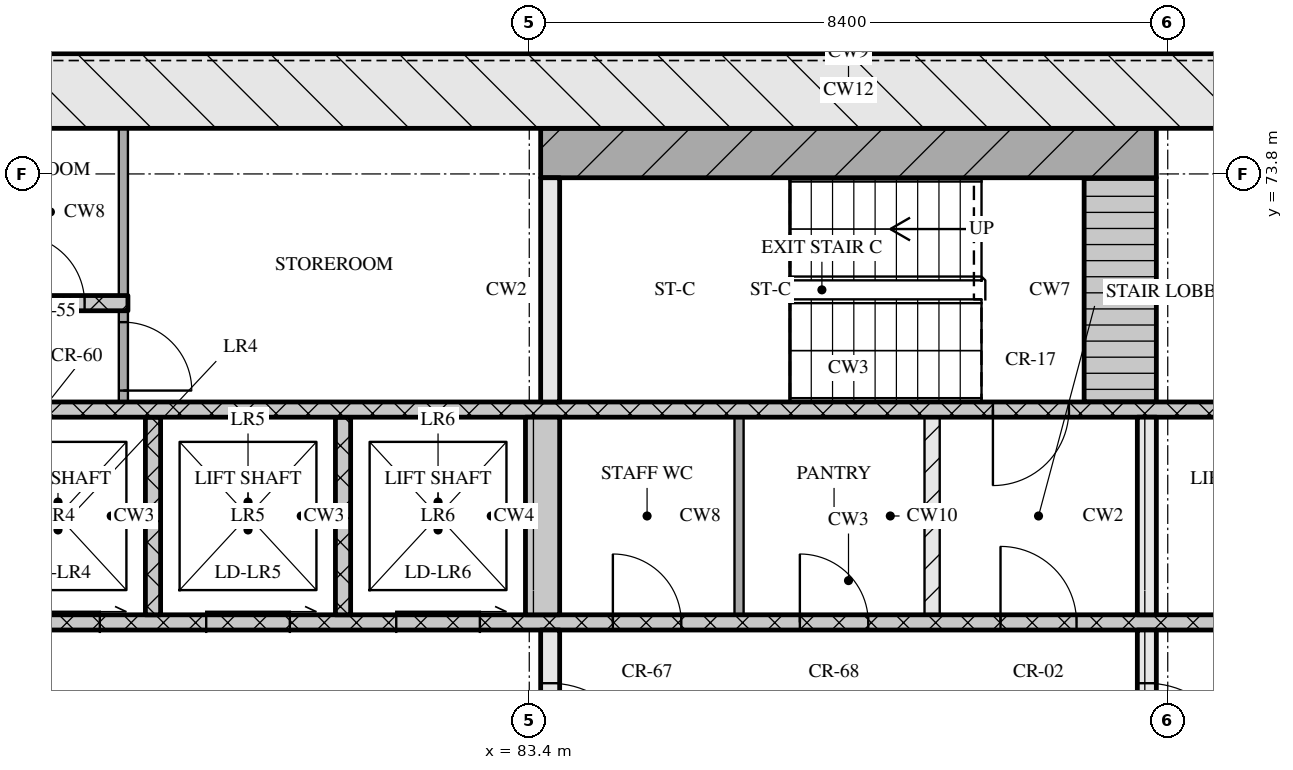
"""IFC4 building model, lengths in metres.
Left out: names, types, materials, properties, quantities, classifications, styles, units other than length and angle.
Written with IfcOpenShell. Run it as: python <this file> out.ifc"""

import sys

from ifc_helpers import new_model, si_unit, direction, frame, frame_2d, origin, place, context, subcontext, project, spatial, rectangle, extrude, element, fill, save


model = new_model("IFC4")
c1 = context("Model", 3, precision=1e-05, world=origin(), true_north=direction((0.0, 1.0)))
c2 = subcontext(c1, "Body", "Model", "MODEL_VIEW")
j1 = project(units=[si_unit("LENGTHUNIT", "METRE"), si_unit("PLANEANGLEUNIT", "RADIAN")], contexts=[c1])
p1 = place(None, origin())
s1 = spatial("IfcSite", under=j1, at=p1, CompositionType="ELEMENT")
p2 = place(p1, origin())
s2 = spatial("IfcBuilding", under=s1, at=p2, CompositionType="ELEMENT")
p3 = place(p2, frame((0.0, 0.0, 131.25)))
s3 = spatial("IfcBuildingStorey", under=s2, at=p3, CompositionType="ELEMENT", Elevation=131.25)
p4 = place(p3, frame((66.8, 74.9, 0.0), z_axis=(0.0, 0.0, 1.0), x_axis=(1.0, 0.0, 0.0)))
e1 = element("IfcWall", 1, at=p4, inside=s3, PredefinedType="SOLIDWALL", context=c2, shape_type="SweptSolid", body=[
    extrude(rectangle(XDim=41.6, YDim=1.0, at=frame_2d((20.8, 0.0))), origin(), (0.0, 0.0, 1.0), 3.32),
])
p5 = place(p3, frame((83.675, 65.2, 0.0), z_axis=(0.0, 0.0, 1.0), x_axis=(0.0, 1.0, 0.0)))
e2 = element("IfcWall", 2, at=p5, inside=s3, PredefinedType="SOLIDWALL", context=c2, shape_type="SweptSolid", body=[
    extrude(rectangle(XDim=2.6, YDim=0.25, at=frame_2d((1.3, 0.0))), origin(), (0.0, 0.0, 1.0), 3.32),
])
p6 = place(p5, frame((0.7, 0.0, 0.0)))
e3 = element("IfcOpeningElement", 3, at=p6, cuts=e2, PredefinedType="OPENING", context=c2, shape_type="SweptSolid", body=[
    extrude(rectangle(XDim=1.2, YDim=2.1, at=frame_2d((0.6, 1.05))), frame((0.0, 0.135, 0.0), z_axis=(0.0, -1.0, 0.0), x_axis=(1.0, 0.0, 0.0)), (0.0, 0.0, 1.0), 0.27),
])
p7 = place(p3, frame((91.525, 65.2, 0.0), z_axis=(0.0, 0.0, 1.0), x_axis=(0.0, 1.0, 0.0)))
e4 = element("IfcWall", 4, at=p7, inside=s3, PredefinedType="SOLIDWALL", context=c2, shape_type="SweptSolid", body=[
    extrude(rectangle(XDim=2.6, YDim=0.25, at=frame_2d((1.3, 0.0))), origin(), (0.0, 0.0, 1.0), 3.32),
])
p8 = place(p7, frame((0.7, 0.0, 0.0)))
e5 = element("IfcOpeningElement", 5, at=p8, cuts=e4, PredefinedType="OPENING", context=c2, shape_type="SweptSolid", body=[
    extrude(rectangle(XDim=1.2, YDim=2.1, at=frame_2d((0.6, 1.05))), frame((0.0, 0.135, 0.0), z_axis=(0.0, -1.0, 0.0), x_axis=(1.0, 0.0, 0.0)), (0.0, 0.0, 1.0), 0.27),
])
p9 = place(p3, frame((76.05, 67.9, 0.0), z_axis=(0.0, 0.0, 1.0), x_axis=(1.0, 0.0, 0.0)))
e6 = element("IfcWall", 6, at=p9, inside=s3, PredefinedType="SOLIDWALL", context=c2, shape_type="SweptSolid", body=[
    extrude(rectangle(XDim=23.1, YDim=0.2, at=frame_2d((11.55, 0.0))), origin(), (0.0, 0.0, 1.0), 3.32),
])
p10 = place(p9, frame((0.6, 0.0, 0.0)))
e7 = element("IfcOpeningElement", 7, at=p10, cuts=e6, PredefinedType="OPENING", context=c2, shape_type="SweptSolid", body=[
    extrude(rectangle(XDim=1.1, YDim=2.1, at=frame_2d((0.55, 1.05))), frame((0.0, 0.11, 0.0), z_axis=(0.0, -1.0, 0.0), x_axis=(1.0, 0.0, 0.0)), (0.0, 0.0, 1.0), 0.22),
])
p11 = place(p9, frame((3.1, 0.0, 0.0)))
e8 = element("IfcOpeningElement", 8, at=p11, cuts=e6, PredefinedType="OPENING", context=c2, shape_type="SweptSolid", body=[
    extrude(rectangle(XDim=1.1, YDim=2.1, at=frame_2d((0.55, 1.05))), frame((0.0, 0.11, 0.0), z_axis=(0.0, -1.0, 0.0), x_axis=(1.0, 0.0, 0.0)), (0.0, 0.0, 1.0), 0.22),
])
p12 = place(p9, frame((5.6, 0.0, 0.0)))
e9 = element("IfcOpeningElement", 9, at=p12, cuts=e6, PredefinedType="OPENING", context=c2, shape_type="SweptSolid", body=[
    extrude(rectangle(XDim=1.1, YDim=2.1, at=frame_2d((0.55, 1.05))), frame((0.0, 0.11, 0.0), z_axis=(0.0, -1.0, 0.0), x_axis=(1.0, 0.0, 0.0)), (0.0, 0.0, 1.0), 0.22),
])
p13 = place(p9, frame((8.45, 0.0, 0.0)))
e10 = element("IfcOpeningElement", 10, at=p13, cuts=e6, PredefinedType="OPENING", context=c2, shape_type="SweptSolid", body=[
    extrude(rectangle(XDim=0.9, YDim=2.1, at=frame_2d((0.45, 1.05))), frame((0.0, 0.11, 0.0), z_axis=(0.0, -1.0, 0.0), x_axis=(1.0, 0.0, 0.0)), (0.0, 0.0, 1.0), 0.22),
])
p14 = place(p9, frame((10.91, 0.0, 0.0)))
e11 = element("IfcOpeningElement", 11, at=p14, cuts=e6, PredefinedType="OPENING", context=c2, shape_type="SweptSolid", body=[
    extrude(rectangle(XDim=0.9, YDim=2.1, at=frame_2d((0.45, 1.05))), frame((0.0, 0.11, 0.0), z_axis=(0.0, -1.0, 0.0), x_axis=(1.0, 0.0, 0.0)), (0.0, 0.0, 1.0), 0.22),
])
p15 = place(p9, frame((13.55, 0.0, 0.0)))
e12 = element("IfcOpeningElement", 12, at=p15, cuts=e6, PredefinedType="OPENING", context=c2, shape_type="SweptSolid", body=[
    extrude(rectangle(XDim=1.0, YDim=2.1, at=frame_2d((0.5, 1.05))), frame((0.0, 0.11, 0.0), z_axis=(0.0, -1.0, 0.0), x_axis=(1.0, 0.0, 0.0)), (0.0, 0.0, 1.0), 0.22),
])
for number, where, z_axis, x_axis in (
    (13, (78.45, 68.0, 0.0), (0.0, 0.0, 1.0), (0.0, 1.0, 0.0)),
    (14, (80.95, 68.0, 0.0), (0.0, 0.0, 1.0), (0.0, 1.0, 0.0)),
):
    element("IfcWall", number, at=place(p3, frame(where, z_axis=z_axis, x_axis=x_axis)), inside=s3, PredefinedType="SOLIDWALL", context=c2, shape_type="SweptSolid", body=[
        extrude(rectangle(XDim=2.6, YDim=0.2, at=frame_2d((1.3, 0.0))), origin(), (0.0, 0.0, 1.0), 3.32),
    ])
p16 = place(p3, frame((83.575, 68.0, 0.0), z_axis=(0.0, 0.0, 1.0), x_axis=(0.0, 1.0, 0.0)))
e15 = element("IfcWall", 15, at=p16, inside=s3, PredefinedType="SOLIDWALL", context=c2, shape_type="SweptSolid", body=[
    extrude(rectangle(XDim=2.6, YDim=0.45, at=frame_2d((1.3, 0.0))), origin(), (0.0, 0.0, 1.0), 3.32),
])
p17 = place(p3, frame((86.16, 68.0, 0.0), z_axis=(0.0, 0.0, 1.0), x_axis=(0.0, 1.0, 0.0)))
e16 = element("IfcWall", 16, at=p17, inside=s3, PredefinedType="PARTITIONING", context=c2, shape_type="SweptSolid", body=[
    extrude(rectangle(XDim=2.6, YDim=0.12, at=frame_2d((1.3, 0.0))), origin(), (0.0, 0.0, 1.0), 3.32),
])
p18 = place(p3, frame((88.7, 68.0, 0.0), z_axis=(0.0, 0.0, 1.0), x_axis=(0.0, 1.0, 0.0)))
e17 = element("IfcWall", 17, at=p18, inside=s3, PredefinedType="PARTITIONING", context=c2, shape_type="SweptSolid", body=[
    extrude(rectangle(XDim=2.6, YDim=0.2, at=frame_2d((1.3, 0.0))), origin(), (0.0, 0.0, 1.0), 3.32),
])
p19 = place(p3, frame((91.525, 68.0, 0.0), z_axis=(0.0, 0.0, 1.0), x_axis=(0.0, 1.0, 0.0)))
e18 = element("IfcWall", 18, at=p19, inside=s3, PredefinedType="SOLIDWALL", context=c2, shape_type="SweptSolid", body=[
    extrude(rectangle(XDim=2.6, YDim=0.25, at=frame_2d((1.3, 0.0))), origin(), (0.0, 0.0, 1.0), 3.32),
])
p20 = place(p3, frame((67.8, 70.7, 0.0), z_axis=(0.0, 0.0, 1.0), x_axis=(1.0, 0.0, 0.0)))
e19 = element("IfcWall", 19, at=p20, inside=s3, PredefinedType="SOLIDWALL", context=c2, shape_type="SweptSolid", body=[
    extrude(rectangle(XDim=39.6, YDim=0.2, at=frame_2d((19.8, 0.0))), origin(), (0.0, 0.0, 1.0), 3.32),
])
p21 = place(p20, frame((0.65, 0.0, 0.0)))
e20 = element("IfcOpeningElement", 20, at=p21, cuts=e19, PredefinedType="OPENING", context=c2, shape_type="SweptSolid", body=[
    extrude(rectangle(XDim=1.1, YDim=2.1, at=frame_2d((0.55, 1.05))), frame((0.0, 0.11, 0.0), z_axis=(0.0, -1.0, 0.0), x_axis=(1.0, 0.0, 0.0)), (0.0, 0.0, 1.0), 0.22),
])
p22 = place(p20, frame((3.25, 0.0, 0.0)))
e21 = element("IfcOpeningElement", 21, at=p22, cuts=e19, PredefinedType="OPENING", context=c2, shape_type="SweptSolid", body=[
    extrude(rectangle(XDim=1.1, YDim=2.1, at=frame_2d((0.55, 1.05))), frame((0.0, 0.11, 0.0), z_axis=(0.0, -1.0, 0.0), x_axis=(1.0, 0.0, 0.0)), (0.0, 0.0, 1.0), 0.22),
])
p23 = place(p20, frame((5.9, 0.0, 0.0)))
e22 = element("IfcOpeningElement", 22, at=p23, cuts=e19, PredefinedType="OPENING", context=c2, shape_type="SweptSolid", body=[
    extrude(rectangle(XDim=1.0, YDim=2.1, at=frame_2d((0.5, 1.05))), frame((0.0, 0.11, 0.0), z_axis=(0.0, -1.0, 0.0), x_axis=(1.0, 0.0, 0.0)), (0.0, 0.0, 1.0), 0.22),
])
p24 = place(p20, frame((21.7, 0.0, 0.0)))
e23 = element("IfcOpeningElement", 23, at=p24, cuts=e19, PredefinedType="OPENING", context=c2, shape_type="SweptSolid", body=[
    extrude(rectangle(XDim=1.0, YDim=2.1, at=frame_2d((0.5, 1.05))), frame((0.0, 0.11, 0.0), z_axis=(0.0, -1.0, 0.0), x_axis=(1.0, 0.0, 0.0)), (0.0, 0.0, 1.0), 0.22),
])
p25 = place(p20, frame((32.7, 0.0, 0.0)))
e24 = element("IfcOpeningElement", 24, at=p25, cuts=e19, PredefinedType="OPENING", context=c2, shape_type="SweptSolid", body=[
    extrude(rectangle(XDim=1.0, YDim=2.1, at=frame_2d((0.5, 1.05))), frame((0.0, 0.11, 0.0), z_axis=(0.0, -1.0, 0.0), x_axis=(1.0, 0.0, 0.0)), (0.0, 0.0, 1.0), 0.22),
])
p26 = place(p20, frame((35.25, 0.0, 0.0)))
e25 = element("IfcOpeningElement", 25, at=p26, cuts=e19, PredefinedType="OPENING", context=c2, shape_type="SweptSolid", body=[
    extrude(rectangle(XDim=1.1, YDim=2.1, at=frame_2d((0.55, 1.05))), frame((0.0, 0.11, 0.0), z_axis=(0.0, -1.0, 0.0), x_axis=(1.0, 0.0, 0.0)), (0.0, 0.0, 1.0), 0.22),
])
p27 = place(p20, frame((37.85, 0.0, 0.0)))
e26 = element("IfcOpeningElement", 26, at=p27, cuts=e19, PredefinedType="OPENING", context=c2, shape_type="SweptSolid", body=[
    extrude(rectangle(XDim=1.1, YDim=2.1, at=frame_2d((0.55, 1.05))), frame((0.0, 0.11, 0.0), z_axis=(0.0, -1.0, 0.0), x_axis=(1.0, 0.0, 0.0)), (0.0, 0.0, 1.0), 0.22),
])
p28 = place(p3, frame((78.06, 70.8, 0.0), z_axis=(0.0, 0.0, 1.0), x_axis=(0.0, 1.0, 0.0)))
e27 = element("IfcWall", 27, at=p28, inside=s3, PredefinedType="PARTITIONING", context=c2, shape_type="SweptSolid", body=[
    extrude(rectangle(XDim=1.2, YDim=0.12, at=frame_2d((0.6, 0.0))), origin(), (0.0, 0.0, 1.0), 3.32),
])
p29 = place(p28, frame((0.15, 0.0, 0.0)))
e28 = element("IfcOpeningElement", 28, at=p29, cuts=e27, PredefinedType="OPENING", context=c2, shape_type="SweptSolid", body=[
    extrude(rectangle(XDim=0.9, YDim=2.1, at=frame_2d((0.45, 1.05))), frame((0.0, 0.07, 0.0), z_axis=(0.0, -1.0, 0.0), x_axis=(1.0, 0.0, 0.0)), (0.0, 0.0, 1.0), 0.14),
])
p30 = place(p3, frame((83.675, 70.8, 0.0), z_axis=(0.0, 0.0, 1.0), x_axis=(0.0, 1.0, 0.0)))
e29 = element("IfcWall", 29, at=p30, inside=s3, PredefinedType="SOLIDWALL", context=c2, shape_type="SweptSolid", body=[
    extrude(rectangle(XDim=2.95, YDim=0.25, at=frame_2d((1.475, 0.0))), origin(), (0.0, 0.0, 1.0), 3.32),
])
p31 = place(p3, frame((91.175, 70.8, 0.0), z_axis=(0.0, 0.0, 1.0), x_axis=(0.0, 1.0, 0.0)))
e30 = element("IfcWall", 30, at=p31, inside=s3, PredefinedType="SOLIDWALL", context=c2, shape_type="SweptSolid", body=[
    extrude(rectangle(XDim=2.95, YDim=0.95, at=frame_2d((1.475, 0.0))), origin(), (0.0, 0.0, 1.0), 3.32),
])
p32 = place(p3, frame((72.8, 72.1, 0.0), z_axis=(0.0, 0.0, 1.0), x_axis=(1.0, 0.0, 0.0)))
e31 = element("IfcWall", 31, at=p32, inside=s3, PredefinedType="SOLIDWALL", context=c2, shape_type="SweptSolid", body=[
    extrude(rectangle(XDim=5.32, YDim=0.2, at=frame_2d((2.66, 0.0))), origin(), (0.0, 0.0, 1.0), 3.32),
])
p33 = place(p32, frame((1.25, 0.0, 0.0)))
e32 = element("IfcOpeningElement", 32, at=p33, cuts=e31, PredefinedType="OPENING", context=c2, shape_type="SweptSolid", body=[
    extrude(rectangle(XDim=0.9, YDim=2.1, at=frame_2d((0.45, 1.05))), frame((0.0, 0.11, 0.0), z_axis=(0.0, -1.0, 0.0), x_axis=(1.0, 0.0, 0.0)), (0.0, 0.0, 1.0), 0.22),
])
p34 = place(p32, frame((3.85, 0.0, 0.0)))
e33 = element("IfcOpeningElement", 33, at=p34, cuts=e31, PredefinedType="OPENING", context=c2, shape_type="SweptSolid", body=[
    extrude(rectangle(XDim=0.9, YDim=2.1, at=frame_2d((0.45, 1.05))), frame((0.0, 0.11, 0.0), z_axis=(0.0, -1.0, 0.0), x_axis=(1.0, 0.0, 0.0)), (0.0, 0.0, 1.0), 0.22),
])
p35 = place(p3, frame((78.06, 72.2, 0.0), z_axis=(0.0, 0.0, 1.0), x_axis=(0.0, 1.0, 0.0)))
e34 = element("IfcWall", 34, at=p35, inside=s3, PredefinedType="PARTITIONING", context=c2, shape_type="SweptSolid", body=[
    extrude(rectangle(XDim=2.2, YDim=0.12, at=frame_2d((1.1, 0.0))), origin(), (0.0, 0.0, 1.0), 3.32),
])
p36 = place(p3, frame((83.55, 74.075, 0.0), z_axis=(0.0, 0.0, 1.0), x_axis=(1.0, 0.0, 0.0)))
e35 = element("IfcWall", 35, at=p36, inside=s3, PredefinedType="SOLIDWALL", context=c2, shape_type="SweptSolid", body=[
    extrude(rectangle(XDim=8.1, YDim=0.65, at=frame_2d((4.05, 0.0))), origin(), (0.0, 0.0, 1.0), 3.32),
])
p37 = place(p6, origin())
e36 = element("IfcDoor", 36, at=p37, inside=s3, OperationType="SINGLE_SWING_RIGHT", PredefinedType="DOOR", context=c2, shape_type="SweptSolid", body=[
    extrude(rectangle(XDim=1.2, YDim=2.1, at=frame_2d((0.6, 1.05))), frame((0.0, 0.025, 0.0), z_axis=(0.0, -1.0, 0.0), x_axis=(1.0, 0.0, 0.0)), (0.0, 0.0, 1.0), 0.05),
])
fill(e3, e36)
p38 = place(p8, origin())
e37 = element("IfcDoor", 37, at=p38, inside=s3, OperationType="SINGLE_SWING_RIGHT", PredefinedType="DOOR", context=c2, shape_type="SweptSolid", body=[
    extrude(rectangle(XDim=1.2, YDim=2.1, at=frame_2d((0.6, 1.05))), frame((0.0, 0.025, 0.0), z_axis=(0.0, -1.0, 0.0), x_axis=(1.0, 0.0, 0.0)), (0.0, 0.0, 1.0), 0.05),
])
fill(e5, e37)
p39 = place(p10, origin())
e38 = element("IfcDoor", 38, at=p39, inside=s3, OperationType="SLIDING_TO_RIGHT", PredefinedType="DOOR", context=c2, shape_type="SweptSolid", body=[
    extrude(rectangle(XDim=1.1, YDim=2.1, at=frame_2d((0.55, 1.05))), frame((0.0, 0.025, 0.0), z_axis=(0.0, -1.0, 0.0), x_axis=(1.0, 0.0, 0.0)), (0.0, 0.0, 1.0), 0.05),
])
fill(e7, e38)
p40 = place(p11, origin())
e39 = element("IfcDoor", 39, at=p40, inside=s3, OperationType="SLIDING_TO_RIGHT", PredefinedType="DOOR", context=c2, shape_type="SweptSolid", body=[
    extrude(rectangle(XDim=1.1, YDim=2.1, at=frame_2d((0.55, 1.05))), frame((0.0, 0.025, 0.0), z_axis=(0.0, -1.0, 0.0), x_axis=(1.0, 0.0, 0.0)), (0.0, 0.0, 1.0), 0.05),
])
fill(e8, e39)
p41 = place(p12, origin())
e40 = element("IfcDoor", 40, at=p41, inside=s3, OperationType="SLIDING_TO_RIGHT", PredefinedType="DOOR", context=c2, shape_type="SweptSolid", body=[
    extrude(rectangle(XDim=1.1, YDim=2.1, at=frame_2d((0.55, 1.05))), frame((0.0, 0.025, 0.0), z_axis=(0.0, -1.0, 0.0), x_axis=(1.0, 0.0, 0.0)), (0.0, 0.0, 1.0), 0.05),
])
fill(e9, e40)
p42 = place(p13, origin())
e41 = element("IfcDoor", 41, at=p42, inside=s3, OperationType="SINGLE_SWING_LEFT", PredefinedType="DOOR", context=c2, shape_type="SweptSolid", body=[
    extrude(rectangle(XDim=0.9, YDim=2.1, at=frame_2d((0.45, 1.05))), frame((0.0, 0.025, 0.0), z_axis=(0.0, -1.0, 0.0), x_axis=(1.0, 0.0, 0.0)), (0.0, 0.0, 1.0), 0.05),
])
fill(e10, e41)
p43 = place(p14, origin())
e42 = element("IfcDoor", 42, at=p43, inside=s3, OperationType="SINGLE_SWING_LEFT", PredefinedType="DOOR", context=c2, shape_type="SweptSolid", body=[
    extrude(rectangle(XDim=0.9, YDim=2.1, at=frame_2d((0.45, 1.05))), frame((0.0, 0.025, 0.0), z_axis=(0.0, -1.0, 0.0), x_axis=(1.0, 0.0, 0.0)), (0.0, 0.0, 1.0), 0.05),
])
fill(e11, e42)
p44 = place(p15, origin())
e43 = element("IfcDoor", 43, at=p44, inside=s3, OperationType="SINGLE_SWING_LEFT", PredefinedType="DOOR", context=c2, shape_type="SweptSolid", body=[
    extrude(rectangle(XDim=1.0, YDim=2.1, at=frame_2d((0.5, 1.05))), frame((0.0, 0.025, 0.0), z_axis=(0.0, -1.0, 0.0), x_axis=(1.0, 0.0, 0.0)), (0.0, 0.0, 1.0), 0.05),
])
fill(e12, e43)
p45 = place(p24, origin())
e44 = element("IfcDoor", 44, at=p45, inside=s3, OperationType="SINGLE_SWING_RIGHT", PredefinedType="DOOR", context=c2, shape_type="SweptSolid", body=[
    extrude(rectangle(XDim=1.0, YDim=2.1, at=frame_2d((0.5, 1.05))), frame((0.0, 0.025, 0.0), z_axis=(0.0, -1.0, 0.0), x_axis=(1.0, 0.0, 0.0)), (0.0, 0.0, 1.0), 0.05),
])
fill(e23, e44)
p46 = place(p29, origin())
e45 = element("IfcDoor", 45, at=p46, inside=s3, OperationType="SINGLE_SWING_RIGHT", PredefinedType="DOOR", context=c2, shape_type="SweptSolid", body=[
    extrude(rectangle(XDim=0.9, YDim=2.1, at=frame_2d((0.45, 1.05))), frame((0.0, 0.025, 0.0), z_axis=(0.0, -1.0, 0.0), x_axis=(1.0, 0.0, 0.0)), (0.0, 0.0, 1.0), 0.05),
])
fill(e28, e45)
p47 = place(p34, origin())
e46 = element("IfcDoor", 46, at=p47, inside=s3, OperationType="SINGLE_SWING_LEFT", PredefinedType="DOOR", context=c2, shape_type="SweptSolid", body=[
    extrude(rectangle(XDim=0.9, YDim=2.1, at=frame_2d((0.45, 1.05))), frame((0.0, 0.025, 0.0), z_axis=(0.0, -1.0, 0.0), x_axis=(1.0, 0.0, 0.0)), (0.0, 0.0, 1.0), 0.05),
])
fill(e33, e46)
save(model, sys.argv[1])
